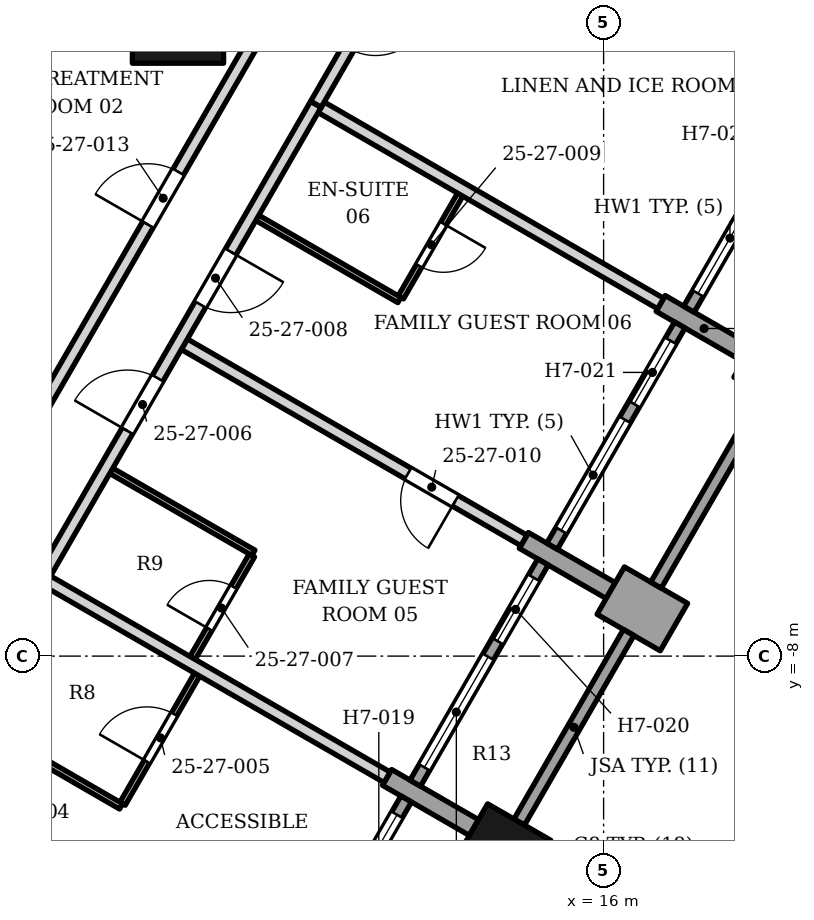
"""IFC4 building model, lengths in metres.
Left out: names, types, materials, properties, quantities, classifications, styles, units other than length and angle.
Written with IfcOpenShell. Run it as: python <this file> out.ifc"""

import sys

from ifc_helpers import new_model, si_unit, direction, frame, frame_2d, origin, origin_2d, place, context, subcontext, project, spatial, rectangle, extrude, element, fill, save


model = new_model("IFC4")
c1 = context("Model", 3, precision=1e-05, world=origin(), true_north=direction((0.0, 1.0)))
c2 = subcontext(c1, "Body", "Model", "MODEL_VIEW")
j1 = project(units=[si_unit("LENGTHUNIT", "METRE"), si_unit("PLANEANGLEUNIT", "RADIAN")], contexts=[c1])
p1 = place(None, origin())
s1 = spatial("IfcSite", under=j1, at=p1, CompositionType="ELEMENT")
p2 = place(p1, origin())
s2 = spatial("IfcBuilding", under=s1, at=p2, CompositionType="ELEMENT")
p3 = place(p2, frame((0.0, 0.0, 112.2)))
s3 = spatial("IfcBuildingStorey", under=s2, at=p3, CompositionType="ELEMENT", Elevation=112.2)
p4 = place(p3, frame((9.0, 2.5, 0.0), z_axis=(0.0, 0.0, 1.0), x_axis=(1.0, 0.0, 0.0)))
e1 = element("IfcColumn", 1, at=p4, inside=s3, PredefinedType="COLUMN", context=c2, shape_type="SweptSolid", body=[
    extrude(rectangle(XDim=1.5, YDim=1.5, at=origin_2d()), origin(), (0.0, 0.0, 1.0), 3.4),
])
for number, where, z_axis, x_axis in (
    (2, (14.387, -11.119, 0.0), (0.0, 0.0, 1.0), (0.5, 0.866, 0.0)),
    (3, (18.887, -3.323, 0.0), (0.0, 0.0, 1.0), (0.5, 0.866, 0.0)),
):
    element("IfcColumn", number, at=place(p3, frame(where, z_axis=z_axis, x_axis=x_axis)), inside=s3, PredefinedType="COLUMN", context=c2, shape_type="SweptSolid", body=[
        extrude(rectangle(XDim=0.9, YDim=1.2, at=origin_2d()), origin(), (0.0, 0.0, 1.0), 3.4),
    ])
p5 = place(p3, frame((12.438, -9.994, 0.0), z_axis=(0.0, 0.0, 1.0), x_axis=(0.866040211805, -0.499974350878, 0.0)))
e4 = element("IfcWall", 4, at=p5, inside=s3, PredefinedType="SOLIDWALL", context=c2, shape_type="SweptSolid", body=[
    extrude(rectangle(XDim=1.65, YDim=0.3, at=frame_2d((0.825, 0.0))), origin(), (0.0, 0.0, 1.0), 2.384),
])
p6 = place(p3, frame((17.156, -7.522, 0.0), z_axis=(0.0, 0.0, 1.0), x_axis=(-0.866006032174, 0.500033551112, 0.0)))
e5 = element("IfcWall", 5, at=p6, inside=s3, PredefinedType="SOLIDWALL", context=c2, shape_type="SweptSolid", body=[
    extrude(rectangle(XDim=1.2, YDim=0.9, at=frame_2d((0.6, 0.0))), origin(), (0.0, 0.0, 1.0), 2.63),
])
p7 = place(p3, frame((14.688, -6.097, 0.0), z_axis=(0.0, 0.0, 1.0), x_axis=(0.866040211805, -0.499974350878, 0.0)))
e6 = element("IfcWall", 6, at=p7, inside=s3, PredefinedType="SOLIDWALL", context=c2, shape_type="SweptSolid", body=[
    extrude(rectangle(XDim=1.65, YDim=0.3, at=frame_2d((0.825, 0.0))), origin(), (0.0, 0.0, 1.0), 2.65),
])
p8 = place(p3, frame((18.366, -3.025, 0.0), z_axis=(0.0, 0.0, 1.0), x_axis=(-0.866057395165, 0.499944585209, 0.0)))
e7 = element("IfcWall", 7, at=p8, inside=s3, PredefinedType="SOLIDWALL", context=c2, shape_type="SweptSolid", body=[
    extrude(rectangle(XDim=1.649, YDim=0.3, at=frame_2d((0.825, 0.0))), origin(), (0.0, 0.0, 1.0), 2.65),
])
p9 = place(p3, frame((10.653, -13.987, 0.0), z_axis=(0.0, 0.0, 1.0), x_axis=(0.499958946799, 0.866049104564, 0.0)))
e8 = element("IfcWall", 8, at=p9, inside=s3, PredefinedType="ELEMENTEDWALL", context=c2, shape_type="SweptSolid", body=[
    extrude(rectangle(XDim=4.2, YDim=0.2, at=frame_2d((2.1, 0.0))), origin(), (0.0, 0.0, 1.0), 2.374),
])
p10 = place(p9, frame((0.3, 0.0, 0.6)))
e9 = element("IfcOpeningElement", 9, at=p10, cuts=e8, PredefinedType="OPENING", context=c2, shape_type="SweptSolid", body=[
    extrude(rectangle(XDim=2.1, YDim=1.67, at=frame_2d((1.05, 0.835))), frame((0.0, 0.11, 0.0), z_axis=(0.0, -1.0, 0.0), x_axis=(1.0, 0.0, 0.0)), (0.0, 0.0, 1.0), 0.22),
])
p11 = place(p9, frame((2.7, 0.0, 0.0)))
e10 = element("IfcOpeningElement", 10, at=p11, cuts=e8, PredefinedType="OPENING", context=c2, shape_type="SweptSolid", body=[
    extrude(rectangle(XDim=1.2, YDim=2.27, at=frame_2d((0.6, 1.135))), frame((0.0, 0.11, 0.0), z_axis=(0.0, -1.0, 0.0), x_axis=(1.0, 0.0, 0.0)), (0.0, 0.0, 1.0), 0.22),
])
p12 = place(p3, frame((14.612, -10.73, 0.0), z_axis=(0.0, 0.0, 1.0), x_axis=(0.500012057535, 0.866018442252, 0.0)))
e11 = element("IfcWall", 11, at=p12, inside=s3, PredefinedType="SOLIDWALL", context=c2, shape_type="SweptSolid", body=[
    extrude(rectangle(XDim=3.6, YDim=0.2, at=frame_2d((1.8, 0.0))), origin(), (0.0, 0.0, 1.0), 2.63),
])
p13 = place(p3, frame((12.903, -10.09, 0.0), z_axis=(0.0, 0.0, 1.0), x_axis=(0.49998411664, 0.866034573852, 0.0)))
e12 = element("IfcWall", 12, at=p13, inside=s3, PredefinedType="ELEMENTEDWALL", context=c2, shape_type="SweptSolid", body=[
    extrude(rectangle(XDim=4.2, YDim=0.2, at=frame_2d((2.1, 0.0))), origin(), (0.0, 0.0, 1.0), 2.384),
])
p14 = place(p13, frame((0.3, 0.0, 0.6)))
e13 = element("IfcOpeningElement", 13, at=p14, cuts=e12, PredefinedType="OPENING", context=c2, shape_type="SweptSolid", body=[
    extrude(rectangle(XDim=2.1, YDim=1.68, at=frame_2d((1.05, 0.84))), frame((0.0, 0.11, 0.0), z_axis=(0.0, -1.0, 0.0), x_axis=(1.0, 0.0, 0.0)), (0.0, 0.0, 1.0), 0.22),
])
p15 = place(p13, frame((2.7, 0.0, 0.0)))
e14 = element("IfcOpeningElement", 14, at=p15, cuts=e12, PredefinedType="OPENING", context=c2, shape_type="SweptSolid", body=[
    extrude(rectangle(XDim=1.2, YDim=2.28, at=frame_2d((0.6, 1.14))), frame((0.0, 0.11, 0.0), z_axis=(0.0, -1.0, 0.0), x_axis=(1.0, 0.0, 0.0)), (0.0, 0.0, 1.0), 0.22),
])
p16 = place(p3, frame((16.862, -6.833, 0.0), z_axis=(0.0, 0.0, 1.0), x_axis=(0.500012057535, 0.866018442252, 0.0)))
e15 = element("IfcWall", 15, at=p16, inside=s3, PredefinedType="SOLIDWALL", context=c2, shape_type="SweptSolid", body=[
    extrude(rectangle(XDim=3.6, YDim=0.2, at=frame_2d((1.8, 0.0))), origin(), (0.0, 0.0, 1.0), 2.63),
])
p17 = place(p3, frame((15.153, -6.192, 0.0), z_axis=(0.0, 0.0, 1.0), x_axis=(0.49998411664, 0.866034573852, 0.0)))
e16 = element("IfcWall", 16, at=p17, inside=s3, PredefinedType="ELEMENTEDWALL", context=c2, shape_type="SweptSolid", body=[
    extrude(rectangle(XDim=4.2, YDim=0.2, at=frame_2d((2.1, 0.0))), origin(), (0.0, 0.0, 1.0), 2.65),
])
p18 = place(p17, frame((0.3, 0.0, 0.6)))
e17 = element("IfcOpeningElement", 17, at=p18, cuts=e16, PredefinedType="OPENING", context=c2, shape_type="SweptSolid", body=[
    extrude(rectangle(XDim=2.1, YDim=1.8, at=frame_2d((1.05, 0.9))), frame((0.0, 0.11, 0.0), z_axis=(0.0, -1.0, 0.0), x_axis=(1.0, 0.0, 0.0)), (0.0, 0.0, 1.0), 0.22),
])
p19 = place(p17, frame((2.7, 0.0, 0.0)))
e18 = element("IfcOpeningElement", 18, at=p19, cuts=e16, PredefinedType="OPENING", context=c2, shape_type="SweptSolid", body=[
    extrude(rectangle(XDim=1.2, YDim=2.4, at=frame_2d((0.6, 1.2))), frame((0.0, 0.11, 0.0), z_axis=(0.0, -1.0, 0.0), x_axis=(1.0, 0.0, 0.0)), (0.0, 0.0, 1.0), 0.22),
])
p20 = place(p3, frame((17.403, -2.295, 0.0), z_axis=(0.0, 0.0, 1.0), x_axis=(0.499958946799, 0.866049104564, 0.0)))
e19 = element("IfcWall", 19, at=p20, inside=s3, PredefinedType="ELEMENTEDWALL", context=c2, shape_type="SweptSolid", body=[
    extrude(rectangle(XDim=4.2, YDim=0.2, at=frame_2d((2.1, 0.0))), origin(), (0.0, 0.0, 1.0), 2.65),
])
p21 = place(p20, frame((0.3, 0.0, 0.6)))
e20 = element("IfcOpeningElement", 20, at=p21, cuts=e19, PredefinedType="OPENING", context=c2, shape_type="SweptSolid", body=[
    extrude(rectangle(XDim=2.1, YDim=1.8, at=frame_2d((1.05, 0.9))), frame((0.0, 0.11, 0.0), z_axis=(0.0, -1.0, 0.0), x_axis=(1.0, 0.0, 0.0)), (0.0, 0.0, 1.0), 0.22),
])
p22 = place(p20, frame((2.7, 0.0, 0.0)))
e21 = element("IfcOpeningElement", 21, at=p22, cuts=e19, PredefinedType="OPENING", context=c2, shape_type="SweptSolid", body=[
    extrude(rectangle(XDim=1.2, YDim=2.4, at=frame_2d((0.6, 1.2))), frame((0.0, 0.11, 0.0), z_axis=(0.0, -1.0, 0.0), x_axis=(1.0, 0.0, 0.0)), (0.0, 0.0, 1.0), 0.22),
])
p23 = place(p3, frame((4.604, -10.665, 0.0), z_axis=(0.0, 0.0, 1.0), x_axis=(0.865901871826, -0.500213902613, 0.0)))
e22 = element("IfcWall", 22, at=p23, inside=s3, PredefinedType="PARTITIONING", context=c2, shape_type="SweptSolid", body=[
    extrude(rectangle(XDim=6.45, YDim=0.2, at=frame_2d((3.225, 0.0))), origin(), (0.0, 0.0, 1.0), 2.374),
])
p24 = place(p3, frame((8.089, -10.428, 0.0), z_axis=(0.0, 0.0, 1.0), x_axis=(0.500018594424, 0.866014668023, 0.0)))
e23 = element("IfcWall", 23, at=p24, inside=s3, PredefinedType="PARTITIONING", context=c2, shape_type="SweptSolid", body=[
    extrude(rectangle(XDim=2.45, YDim=0.1, at=frame_2d((1.225, 0.0))), origin(), (0.0, 0.0, 1.0), 2.552),
])
p25 = place(p24, frame((0.8, 0.0, 0.0)))
e24 = element("IfcOpeningElement", 24, at=p25, cuts=e23, PredefinedType="OPENING", context=c2, shape_type="SweptSolid", body=[
    extrude(rectangle(XDim=0.9, YDim=2.1, at=frame_2d((0.45, 1.05))), frame((0.0, 0.06, 0.0), z_axis=(0.0, -1.0, 0.0), x_axis=(1.0, 0.0, 0.0)), (0.0, 0.0, 1.0), 0.12),
])
p26 = place(p3, frame((5.553, -9.02, 0.0), z_axis=(0.0, 0.0, 1.0), x_axis=(0.865729701078, -0.500511822708, 0.0)))
e25 = element("IfcWall", 25, at=p26, inside=s3, PredefinedType="PARTITIONING", context=c2, shape_type="SweptSolid", body=[
    extrude(rectangle(XDim=2.9, YDim=0.1, at=frame_2d((1.45, 0.0))), origin(), (0.0, 0.0, 1.0), 3.23),
])
p27 = place(p3, frame((9.24, -8.032, 0.0), z_axis=(0.0, 0.0, 1.0), x_axis=(0.500675951608, 0.865634791053, 0.0)))
e26 = element("IfcWall", 26, at=p27, inside=s3, PredefinedType="PARTITIONING", context=c2, shape_type="SweptSolid", body=[
    extrude(rectangle(XDim=1.95, YDim=0.1, at=frame_2d((0.975, 0.0))), origin(), (0.0, 0.0, 1.0), 3.23),
])
p28 = place(p27, frame((0.55, 0.0, 0.0)))
e27 = element("IfcOpeningElement", 27, at=p28, cuts=e26, PredefinedType="OPENING", context=c2, shape_type="SweptSolid", body=[
    extrude(rectangle(XDim=0.8, YDim=2.1, at=frame_2d((0.4, 1.05))), frame((0.0, 0.06, 0.0), z_axis=(0.0, -1.0, 0.0), x_axis=(1.0, 0.0, 0.0)), (0.0, 0.0, 1.0), 0.12),
])
p29 = place(p3, frame((6.854, -6.768, 0.0), z_axis=(0.0, 0.0, 1.0), x_axis=(0.866012238917, -0.500022801525, 0.0)))
e28 = element("IfcWall", 28, at=p29, inside=s3, PredefinedType="PARTITIONING", context=c2, shape_type="SweptSolid", body=[
    extrude(rectangle(XDim=6.45, YDim=0.2, at=frame_2d((3.225, 0.0))), origin(), (0.0, 0.0, 1.0), 2.552),
])
p30 = place(p3, frame((7.902, -4.952, 0.0), z_axis=(0.0, 0.0, 1.0), x_axis=(0.866339109022, -0.499456252518, 0.0)))
e29 = element("IfcWall", 29, at=p30, inside=s3, PredefinedType="PARTITIONING", context=c2, shape_type="SweptSolid", body=[
    extrude(rectangle(XDim=2.7, YDim=0.1, at=frame_2d((1.35, 0.0))), origin(), (0.0, 0.0, 1.0), 2.552),
])
p31 = place(p3, frame((6.348, -4.639, 0.0), z_axis=(0.0, 0.0, 1.0), x_axis=(0.500160597015, 0.865932663198, 0.0)))
e30 = element("IfcWall", 30, at=p31, inside=s3, PredefinedType="PARTITIONING", context=c2, shape_type="SweptSolid", body=[
    extrude(rectangle(XDim=9.63, YDim=0.2, at=frame_2d((4.815, 0.0))), origin(), (0.0, 0.0, 1.0), 2.552),
])
p32 = place(p31, frame((4.315, 0.0, 0.0)))
e31 = element("IfcOpeningElement", 31, at=p32, cuts=e30, PredefinedType="OPENING", context=c2, shape_type="SweptSolid", body=[
    extrude(rectangle(XDim=1.0, YDim=2.1, at=frame_2d((0.5, 1.05))), frame((0.0, 0.11, 0.0), z_axis=(0.0, -1.0, 0.0), x_axis=(1.0, 0.0, 0.0)), (0.0, 0.0, 1.0), 0.22),
])
p33 = place(p3, frame((9.104, -2.871, 0.0), z_axis=(0.0, 0.0, 1.0), x_axis=(0.865901871826, -0.500213902613, 0.0)))
e32 = element("IfcWall", 32, at=p33, inside=s3, PredefinedType="PARTITIONING", context=c2, shape_type="SweptSolid", body=[
    extrude(rectangle(XDim=6.45, YDim=0.2, at=frame_2d((3.225, 0.0))), origin(), (0.0, 0.0, 1.0), 2.384),
])
p34 = place(p33, frame((4.25, 0.0, 0.0)))
e33 = element("IfcOpeningElement", 33, at=p34, cuts=e32, PredefinedType="OPENING", context=c2, shape_type="SweptSolid", body=[
    extrude(rectangle(XDim=0.9, YDim=2.1, at=frame_2d((0.45, 1.05))), frame((0.0, 0.11, 0.0), z_axis=(0.0, -1.0, 0.0), x_axis=(1.0, 0.0, 0.0)), (0.0, 0.0, 1.0), 0.22),
])
p35 = place(p3, frame((12.666, -2.101, 0.0), z_axis=(0.0, 0.0, 1.0), x_axis=(0.49995005938, 0.866054235095, 0.0)))
e34 = element("IfcWall", 34, at=p35, inside=s3, PredefinedType="PARTITIONING", context=c2, shape_type="SweptSolid", body=[
    extrude(rectangle(XDim=1.95, YDim=0.1, at=frame_2d((0.975, 0.0))), origin(), (0.0, 0.0, 1.0), 2.384),
])
p36 = place(p35, frame((0.6, 0.0, 0.0)))
e35 = element("IfcOpeningElement", 35, at=p36, cuts=e34, PredefinedType="OPENING", context=c2, shape_type="SweptSolid", body=[
    extrude(rectangle(XDim=0.8, YDim=2.1, at=frame_2d((0.4, 1.05))), frame((0.0, 0.06, 0.0), z_axis=(0.0, -1.0, 0.0), x_axis=(1.0, 0.0, 0.0)), (0.0, 0.0, 1.0), 0.12),
])
p37 = place(p3, frame((10.303, -0.792, 0.0), z_axis=(0.0, 0.0, 1.0), x_axis=(0.86571095196, -0.500544251447, 0.0)))
e36 = element("IfcWall", 36, at=p37, inside=s3, PredefinedType="PARTITIONING", context=c2, shape_type="SweptSolid", body=[
    extrude(rectangle(XDim=2.7, YDim=0.1, at=frame_2d((1.35, 0.0))), origin(), (0.0, 0.0, 1.0), 3.23),
])
p38 = place(p3, frame((11.355, 1.025, 0.0), z_axis=(0.0, 0.0, 1.0), x_axis=(0.865748417306, -0.500479448062, 0.0)))
e37 = element("IfcWall", 37, at=p38, inside=s3, PredefinedType="PARTITIONING", context=c2, shape_type="SweptSolid", body=[
    extrude(rectangle(XDim=6.448, YDim=0.2, at=frame_2d((3.224, 0.0))), origin(), (0.0, 0.0, 1.0), 2.384),
])
p39 = place(p3, frame((0.018, -18.412, 0.0), z_axis=(0.0, 0.0, 1.0), x_axis=(0.49999953585, 0.866025671762, 0.0)))
e38 = element("IfcWall", 38, at=p39, inside=s3, PredefinedType="PARTITIONING", context=c2, shape_type="SweptSolid", body=[
    extrude(rectangle(XDim=22.5, YDim=0.2, at=frame_2d((11.25, 0.0))), origin(), (0.0, 0.0, 1.0), 2.374),
])
p40 = place(p39, frame((4.0, 0.0, 0.0)))
e39 = element("IfcOpeningElement", 39, at=p40, cuts=e38, PredefinedType="OPENING", context=c2, shape_type="SweptSolid", body=[
    extrude(rectangle(XDim=1.0, YDim=2.1, at=frame_2d((0.5, 1.05))), frame((0.0, 0.11, 0.0), z_axis=(0.0, -1.0, 0.0), x_axis=(1.0, 0.0, 0.0)), (0.0, 0.0, 1.0), 0.22),
])
p41 = place(p39, frame((9.5, 0.0, 0.0)))
e40 = element("IfcOpeningElement", 40, at=p41, cuts=e38, PredefinedType="OPENING", context=c2, shape_type="SweptSolid", body=[
    extrude(rectangle(XDim=1.1, YDim=2.1, at=frame_2d((0.55, 1.05))), frame((0.0, 0.11, 0.0), z_axis=(0.0, -1.0, 0.0), x_axis=(1.0, 0.0, 0.0)), (0.0, 0.0, 1.0), 0.22),
])
p42 = place(p39, frame((16.3, 0.0, 0.0)))
e41 = element("IfcOpeningElement", 41, at=p42, cuts=e38, PredefinedType="OPENING", context=c2, shape_type="SweptSolid", body=[
    extrude(rectangle(XDim=1.0, YDim=2.1, at=frame_2d((0.5, 1.05))), frame((0.0, 0.11, 0.0), z_axis=(0.0, -1.0, 0.0), x_axis=(1.0, 0.0, 0.0)), (0.0, 0.0, 1.0), 0.22),
])
p43 = place(p39, frame((18.7, 0.0, 0.0)))
e42 = element("IfcOpeningElement", 42, at=p43, cuts=e38, PredefinedType="OPENING", context=c2, shape_type="SweptSolid", body=[
    extrude(rectangle(XDim=1.0, YDim=2.1, at=frame_2d((0.5, 1.05))), frame((0.0, 0.11, 0.0), z_axis=(0.0, -1.0, 0.0), x_axis=(1.0, 0.0, 0.0)), (0.0, 0.0, 1.0), 0.22),
])
p44 = place(p3, frame((11.269, 1.075, 0.0), z_axis=(0.0, 0.0, 1.0), x_axis=(0.499554983499, 0.866282181775, 0.0)))
e43 = element("IfcWall", 43, at=p44, inside=s3, PredefinedType="PARTITIONING", context=c2, shape_type="SweptSolid", body=[
    extrude(rectangle(XDim=3.029, YDim=0.2, at=frame_2d((1.515, 0.0))), origin(), (0.0, 0.0, 1.0), 3.23),
])
p45 = place(p44, frame((1.064, 0.0, 0.0)))
e44 = element("IfcOpeningElement", 44, at=p45, cuts=e43, PredefinedType="OPENING", context=c2, shape_type="SweptSolid", body=[
    extrude(rectangle(XDim=0.9, YDim=2.1, at=frame_2d((0.45, 1.05))), frame((0.0, 0.11, 0.0), z_axis=(0.0, -1.0, 0.0), x_axis=(1.0, 0.0, 0.0)), (0.0, 0.0, 1.0), 0.22),
])
p46 = place(p11, origin())
e45 = element("IfcDoor", 45, at=p46, inside=s3, OperationType="SINGLE_SWING_LEFT", PredefinedType="DOOR", context=c2, shape_type="SweptSolid", body=[
    extrude(rectangle(XDim=1.2, YDim=2.27, at=frame_2d((0.6, 1.135))), frame((0.0, 0.025, 0.0), z_axis=(0.0, -1.0, 0.0), x_axis=(1.0, 0.0, 0.0)), (0.0, 0.0, 1.0), 0.05),
])
fill(e10, e45)
p47 = place(p14, origin())
e46 = element("IfcWindow", 46, at=p47, inside=s3, PartitioningType="SINGLE_PANEL", PredefinedType="WINDOW", context=c2, shape_type="SweptSolid", body=[
    extrude(rectangle(XDim=2.1, YDim=1.68, at=frame_2d((1.05, 0.84))), frame((0.0, 0.03, 0.0), z_axis=(0.0, -1.0, 0.0), x_axis=(1.0, 0.0, 0.0)), (0.0, 0.0, 1.0), 0.06),
])
fill(e13, e46)
p48 = place(p15, origin())
e47 = element("IfcDoor", 47, at=p48, inside=s3, OperationType="SINGLE_SWING_LEFT", PredefinedType="DOOR", context=c2, shape_type="SweptSolid", body=[
    extrude(rectangle(XDim=1.2, YDim=2.28, at=frame_2d((0.6, 1.14))), frame((0.0, 0.025, 0.0), z_axis=(0.0, -1.0, 0.0), x_axis=(1.0, 0.0, 0.0)), (0.0, 0.0, 1.0), 0.05),
])
fill(e14, e47)
p49 = place(p18, origin())
e48 = element("IfcWindow", 48, at=p49, inside=s3, PartitioningType="SINGLE_PANEL", PredefinedType="WINDOW", context=c2, shape_type="SweptSolid", body=[
    extrude(rectangle(XDim=2.1, YDim=1.8, at=frame_2d((1.05, 0.9))), frame((0.0, 0.03, 0.0), z_axis=(0.0, -1.0, 0.0), x_axis=(1.0, 0.0, 0.0)), (0.0, 0.0, 1.0), 0.06),
])
fill(e17, e48)
p50 = place(p19, origin())
e49 = element("IfcDoor", 49, at=p50, inside=s3, OperationType="SINGLE_SWING_LEFT", PredefinedType="DOOR", context=c2, shape_type="SweptSolid", body=[
    extrude(rectangle(XDim=1.2, YDim=2.4, at=frame_2d((0.6, 1.2))), frame((0.0, 0.025, 0.0), z_axis=(0.0, -1.0, 0.0), x_axis=(1.0, 0.0, 0.0)), (0.0, 0.0, 1.0), 0.05),
])
fill(e18, e49)
p51 = place(p21, origin())
e50 = element("IfcWindow", 50, at=p51, inside=s3, PartitioningType="SINGLE_PANEL", PredefinedType="WINDOW", context=c2, shape_type="SweptSolid", body=[
    extrude(rectangle(XDim=2.1, YDim=1.8, at=frame_2d((1.05, 0.9))), frame((0.0, 0.03, 0.0), z_axis=(0.0, -1.0, 0.0), x_axis=(1.0, 0.0, 0.0)), (0.0, 0.0, 1.0), 0.06),
])
fill(e20, e50)
p52 = place(p25, origin())
e51 = element("IfcDoor", 51, at=p52, inside=s3, OperationType="SINGLE_SWING_LEFT", PredefinedType="DOOR", context=c2, shape_type="SweptSolid", body=[
    extrude(rectangle(XDim=0.9, YDim=2.1, at=frame_2d((0.45, 1.05))), frame((0.0, 0.025, 0.0), z_axis=(0.0, -1.0, 0.0), x_axis=(1.0, 0.0, 0.0)), (0.0, 0.0, 1.0), 0.05),
])
fill(e24, e51)
p53 = place(p42, origin())
e52 = element("IfcDoor", 52, at=p53, inside=s3, OperationType="SINGLE_SWING_LEFT", PredefinedType="DOOR", context=c2, shape_type="SweptSolid", body=[
    extrude(rectangle(XDim=1.0, YDim=2.1, at=frame_2d((0.5, 1.05))), frame((0.0, 0.025, 0.0), z_axis=(0.0, -1.0, 0.0), x_axis=(1.0, 0.0, 0.0)), (0.0, 0.0, 1.0), 0.05),
])
fill(e41, e52)
p54 = place(p28, origin())
e53 = element("IfcDoor", 53, at=p54, inside=s3, OperationType="SINGLE_SWING_LEFT", PredefinedType="DOOR", context=c2, shape_type="SweptSolid", body=[
    extrude(rectangle(XDim=0.8, YDim=2.1, at=frame_2d((0.4, 1.05))), frame((0.0, 0.025, 0.0), z_axis=(0.0, -1.0, 0.0), x_axis=(1.0, 0.0, 0.0)), (0.0, 0.0, 1.0), 0.05),
])
fill(e27, e53)
p55 = place(p43, origin())
e54 = element("IfcDoor", 54, at=p55, inside=s3, OperationType="SINGLE_SWING_RIGHT", PredefinedType="DOOR", context=c2, shape_type="SweptSolid", body=[
    extrude(rectangle(XDim=1.0, YDim=2.1, at=frame_2d((0.5, 1.05))), frame((0.0, 0.025, 0.0), z_axis=(0.0, -1.0, 0.0), x_axis=(1.0, 0.0, 0.0)), (0.0, 0.0, 1.0), 0.05),
])
fill(e42, e54)
p56 = place(p36, origin())
e55 = element("IfcDoor", 55, at=p56, inside=s3, OperationType="SINGLE_SWING_RIGHT", PredefinedType="DOOR", context=c2, shape_type="SweptSolid", body=[
    extrude(rectangle(XDim=0.8, YDim=2.1, at=frame_2d((0.4, 1.05))), frame((0.0, 0.025, 0.0), z_axis=(0.0, -1.0, 0.0), x_axis=(1.0, 0.0, 0.0)), (0.0, 0.0, 1.0), 0.05),
])
fill(e35, e55)
p57 = place(p34, origin())
e56 = element("IfcDoor", 56, at=p57, inside=s3, OperationType="SINGLE_SWING_RIGHT", PredefinedType="DOOR", context=c2, shape_type="SweptSolid", body=[
    extrude(rectangle(XDim=0.9, YDim=2.1, at=frame_2d((0.45, 1.05))), frame((0.0, 0.025, 0.0), z_axis=(0.0, -1.0, 0.0), x_axis=(1.0, 0.0, 0.0)), (0.0, 0.0, 1.0), 0.05),
])
fill(e33, e56)
p58 = place(p32, origin())
e57 = element("IfcDoor", 57, at=p58, inside=s3, OperationType="SINGLE_SWING_LEFT", PredefinedType="DOOR", context=c2, shape_type="SweptSolid", body=[
    extrude(rectangle(XDim=1.0, YDim=2.1, at=frame_2d((0.5, 1.05))), frame((0.0, 0.025, 0.0), z_axis=(0.0, -1.0, 0.0), x_axis=(1.0, 0.0, 0.0)), (0.0, 0.0, 1.0), 0.05),
])
fill(e31, e57)
save(model, sys.argv[1])
